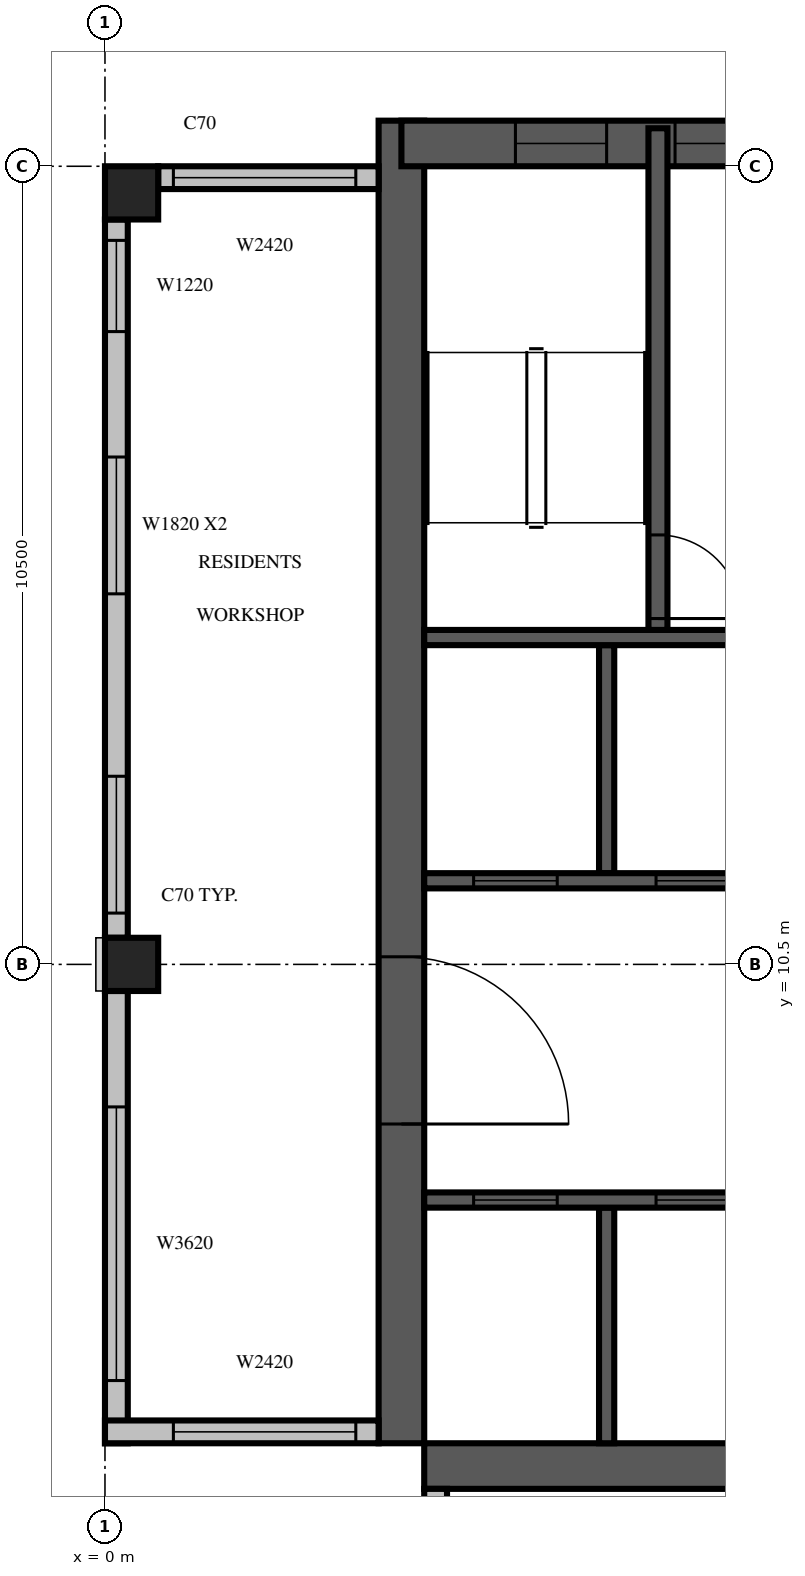
"""IFC4 building model, lengths in metres.
Left out: names, types, materials, properties, quantities, classifications, styles, units other than length and angle.
Written with IfcOpenShell. Run it as: python <this file> out.ifc"""

import sys

from ifc_helpers import new_model, si_unit, direction, frame, frame_2d, origin, origin_2d, place, context, subcontext, project, spatial, rectangle, extrude, source, transform, mapped, element, fill, save


model = new_model("IFC4")
c1 = context("Model", 3, precision=1e-05, world=origin(), true_north=direction((0.0, 1.0)))
c2 = subcontext(c1, "Body", "Model", "MODEL_VIEW")
j1 = project(units=[si_unit("LENGTHUNIT", "METRE"), si_unit("PLANEANGLEUNIT", "RADIAN")], contexts=[c1])
p1 = place(None, origin())
s1 = spatial("IfcSite", under=j1, at=p1, CompositionType="ELEMENT")
p2 = place(p1, origin())
s2 = spatial("IfcBuilding", under=s1, at=p2, CompositionType="ELEMENT")
p3 = place(p2, frame((0.0, 0.0, 316.0)))
s3 = spatial("IfcBuildingStorey", under=s2, at=p3, CompositionType="ELEMENT", Elevation=316.0)
m1 = source(origin(), c2, "Body", "SweptSolid", [
    extrude(rectangle(XDim=0.7, YDim=0.7, at=origin_2d()), origin(), (0.0, 0.0, 1.0), 3.5),
])
for number, where, z_axis, x_axis in (
    (1, (0.35, 10.5, 0.0), (0.0, 0.0, 1.0), (1.0, 0.0, 0.0)),
    (2, (0.35, 20.65, 0.0), (0.0, 0.0, 1.0), (1.0, 0.0, 0.0)),
):
    element("IfcColumn", number, at=place(p3, frame(where, z_axis=z_axis, x_axis=x_axis)), inside=s3, PredefinedType="COLUMN", context=c2, shape_type="MappedRepresentation", body=[
        mapped(m1, transform((0.0, 0.0, 0.0), scale=1.0)),
    ])
m2 = source(origin(), c2, "Body", "SweptSolid", [
    extrude(rectangle(XDim=17.4, YDim=0.6, at=frame_2d((8.7, 0.0))), origin(), (0.0, 0.0, 1.0), 3.5),
])
p4 = place(p3, frame((3.9, 4.2, 0.0), z_axis=(0.0, 0.0, 1.0), x_axis=(0.0, 1.0, 0.0)))
e3 = element("IfcWall", 3, at=p4, inside=s3, PredefinedType="SHEAR", context=c2, shape_type="MappedRepresentation", body=[
    mapped(m2, transform((0.0, 0.0, 0.0), scale=1.0)),
])
m3 = source(origin(), c2, "Body", "SweptSolid", [
    extrude(rectangle(XDim=2.2, YDim=2.1, at=frame_2d((1.1, 1.05))), frame((0.0, 0.31, 0.0), z_axis=(0.0, -1.0, 0.0), x_axis=(1.0, 0.0, 0.0)), (0.0, 0.0, 1.0), 0.62),
])
p5 = place(p4, frame((4.2, 0.0, 0.0)))
e4 = element("IfcOpeningElement", 4, at=p5, cuts=e3, PredefinedType="OPENING", context=c2, shape_type="MappedRepresentation", body=[
    mapped(m3, transform((0.0, 0.0, 0.0), scale=1.0)),
])
p6 = place(p3, frame((4.2, 3.9, 0.0), z_axis=(0.0, 0.0, 1.0), x_axis=(1.0, 0.0, 0.0)))
e5 = element("IfcWall", 5, at=p6, inside=s3, PredefinedType="SHEAR", context=c2, shape_type="MappedRepresentation", body=[
    mapped(m2, transform((0.0, 0.0, 0.0), scale=1.0)),
])
m4 = source(origin(), c2, "Body", "SweptSolid", [
    extrude(rectangle(XDim=0.9, YDim=2.1, at=frame_2d((0.45, 1.05))), frame((0.0, 0.31, 0.0), z_axis=(0.0, -1.0, 0.0), x_axis=(1.0, 0.0, 0.0)), (0.0, 0.0, 1.0), 0.62),
])
p7 = place(p6, frame((14.0, 0.0, 0.0)))
e6 = element("IfcOpeningElement", 6, at=p7, cuts=e5, PredefinedType="OPENING", context=c2, shape_type="MappedRepresentation", body=[
    mapped(m4, transform((0.0, 0.0, 0.0), scale=1.0)),
])
m5 = source(origin(), c2, "Body", "SweptSolid", [
    extrude(rectangle(XDim=6.6, YDim=0.6, at=frame_2d((3.3, 0.0))), origin(), (0.0, 0.0, 1.0), 3.5),
])
p8 = place(p3, frame((3.9, 21.3, 0.0), z_axis=(0.0, 0.0, 1.0), x_axis=(1.0, 0.0, 0.0)))
e7 = element("IfcWall", 7, at=p8, inside=s3, PredefinedType="SHEAR", context=c2, shape_type="MappedRepresentation", body=[
    mapped(m5, transform((0.0, 0.0, 0.0), scale=1.0)),
])
m6 = source(origin(), c2, "Body", "SweptSolid", [
    extrude(rectangle(XDim=1.2, YDim=2.4, at=frame_2d((0.6, 1.2))), frame((0.0, 0.31, 0.0), z_axis=(0.0, -1.0, 0.0), x_axis=(1.0, 0.0, 0.0)), (0.0, 0.0, 1.0), 0.62),
])
p9 = place(p8, frame((1.5, 0.0, 0.6)))
e8 = element("IfcOpeningElement", 8, at=p9, cuts=e7, PredefinedType="OPENING", context=c2, shape_type="MappedRepresentation", body=[
    mapped(m6, transform((0.0, 0.0, 0.0), scale=1.0)),
])
p10 = place(p8, frame((3.6, 0.0, 0.6)))
e9 = element("IfcOpeningElement", 9, at=p10, cuts=e7, PredefinedType="OPENING", context=c2, shape_type="MappedRepresentation", body=[
    mapped(m6, transform((0.0, 0.0, 0.0), scale=1.0)),
])
m7 = source(origin(), c2, "Body", "SweptSolid", [
    extrude(rectangle(XDim=2.9, YDim=0.3, at=frame_2d((1.45, 0.0))), origin(), (0.0, 0.0, 1.0), 3.1),
])
p11 = place(p3, frame((3.6, 20.85, 0.0), z_axis=(0.0, 0.0, 1.0), x_axis=(-1.0, 0.0, 0.0)))
e10 = element("IfcWall", 10, at=p11, inside=s3, PredefinedType="STANDARD", context=c2, shape_type="MappedRepresentation", body=[
    mapped(m7, transform((0.0, 0.0, 0.0), scale=1.0)),
])
m8 = source(origin(), c2, "Body", "SweptSolid", [
    extrude(rectangle(XDim=2.4, YDim=2.0, at=frame_2d((1.2, 1.0))), frame((0.0, 0.16, 0.0), z_axis=(0.0, -1.0, 0.0), x_axis=(1.0, 0.0, 0.0)), (0.0, 0.0, 1.0), 0.32),
])
p12 = place(p11, frame((0.3, 0.0, 0.6)))
e11 = element("IfcOpeningElement", 11, at=p12, cuts=e10, PredefinedType="OPENING", context=c2, shape_type="MappedRepresentation", body=[
    mapped(m8, transform((0.0, 0.0, 0.0), scale=1.0)),
])
m9 = source(origin(), c2, "Body", "SweptSolid", [
    extrude(rectangle(XDim=9.45, YDim=0.3, at=frame_2d((4.725, 0.0))), origin(), (0.0, 0.0, 1.0), 3.1),
])
p13 = place(p3, frame((0.15, 20.3, 0.0), z_axis=(0.0, 0.0, 1.0), x_axis=(0.0, -1.0, 0.0)))
e12 = element("IfcWall", 12, at=p13, inside=s3, PredefinedType="STANDARD", context=c2, shape_type="MappedRepresentation", body=[
    mapped(m9, transform((0.0, 0.0, 0.0), scale=1.0)),
])
m10 = source(origin(), c2, "Body", "SweptSolid", [
    extrude(rectangle(XDim=1.2, YDim=2.0, at=frame_2d((0.6, 1.0))), frame((0.0, 0.16, 0.0), z_axis=(0.0, -1.0, 0.0), x_axis=(1.0, 0.0, 0.0)), (0.0, 0.0, 1.0), 0.32),
])
p14 = place(p13, frame((0.275, 0.0, 0.6)))
e13 = element("IfcOpeningElement", 13, at=p14, cuts=e12, PredefinedType="OPENING", context=c2, shape_type="MappedRepresentation", body=[
    mapped(m10, transform((0.0, 0.0, 0.0), scale=1.0)),
])
m11 = source(origin(), c2, "Body", "SweptSolid", [
    extrude(rectangle(XDim=1.8, YDim=2.0, at=frame_2d((0.9, 1.0))), frame((0.0, 0.16, 0.0), z_axis=(0.0, -1.0, 0.0), x_axis=(1.0, 0.0, 0.0)), (0.0, 0.0, 1.0), 0.32),
])
p15 = place(p13, frame((3.125, 0.0, 0.6)))
e14 = element("IfcOpeningElement", 14, at=p15, cuts=e12, PredefinedType="OPENING", context=c2, shape_type="MappedRepresentation", body=[
    mapped(m11, transform((0.0, 0.0, 0.0), scale=1.0)),
])
p16 = place(p13, frame((7.325, 0.0, 0.6)))
e15 = element("IfcOpeningElement", 15, at=p16, cuts=e12, PredefinedType="OPENING", context=c2, shape_type="MappedRepresentation", body=[
    mapped(m11, transform((0.0, 0.0, 0.0), scale=1.0)),
])
m12 = source(origin(), c2, "Body", "SweptSolid", [
    extrude(rectangle(XDim=5.95, YDim=0.3, at=frame_2d((2.975, 0.0))), origin(), (0.0, 0.0, 1.0), 3.1),
])
p17 = place(p3, frame((0.15, 10.15, 0.0), z_axis=(0.0, 0.0, 1.0), x_axis=(0.0, -1.0, 0.0)))
e16 = element("IfcWall", 16, at=p17, inside=s3, PredefinedType="STANDARD", context=c2, shape_type="MappedRepresentation", body=[
    mapped(m12, transform((0.0, 0.0, 0.0), scale=1.0)),
])
m13 = source(origin(), c2, "Body", "SweptSolid", [
    extrude(rectangle(XDim=3.6, YDim=2.0, at=frame_2d((1.8, 1.0))), frame((0.0, 0.16, 0.0), z_axis=(0.0, -1.0, 0.0), x_axis=(1.0, 0.0, 0.0)), (0.0, 0.0, 1.0), 0.32),
])
p18 = place(p17, frame((1.525, 0.0, 0.6)))
e17 = element("IfcOpeningElement", 17, at=p18, cuts=e16, PredefinedType="OPENING", context=c2, shape_type="MappedRepresentation", body=[
    mapped(m13, transform((0.0, 0.0, 0.0), scale=1.0)),
])
m14 = source(origin(), c2, "Body", "SweptSolid", [
    extrude(rectangle(XDim=3.6, YDim=0.3, at=frame_2d((1.8, 0.0))), origin(), (0.0, 0.0, 1.0), 3.1),
])
p19 = place(p3, frame((0.0, 4.35, 0.0), z_axis=(0.0, 0.0, 1.0), x_axis=(1.0, 0.0, 0.0)))
e18 = element("IfcWall", 18, at=p19, inside=s3, PredefinedType="STANDARD", context=c2, shape_type="MappedRepresentation", body=[
    mapped(m14, transform((0.0, 0.0, 0.0), scale=1.0)),
])
p20 = place(p19, frame((0.9, 0.0, 0.6)))
e19 = element("IfcOpeningElement", 19, at=p20, cuts=e18, PredefinedType="OPENING", context=c2, shape_type="MappedRepresentation", body=[
    mapped(m8, transform((0.0, 0.0, 0.0), scale=1.0)),
])
p21 = place(p3, frame((4.35, 3.6, 0.0), z_axis=(0.0, 0.0, 1.0), x_axis=(0.0, -1.0, 0.0)))
e20 = element("IfcWall", 20, at=p21, inside=s3, PredefinedType="STANDARD", context=c2, shape_type="MappedRepresentation", body=[
    mapped(m14, transform((0.0, 0.0, 0.0), scale=1.0)),
])
p22 = place(p21, frame((0.3, 0.0, 0.6)))
e21 = element("IfcOpeningElement", 21, at=p22, cuts=e20, PredefinedType="OPENING", context=c2, shape_type="MappedRepresentation", body=[
    mapped(m8, transform((0.0, 0.0, 0.0), scale=1.0)),
])
m15 = source(origin(), c2, "Body", "SweptSolid", [
    extrude(rectangle(XDim=3.1, YDim=0.2, at=frame_2d((1.55, 0.0))), origin(), (0.0, 0.0, 1.0), 3.5),
])
p23 = place(p3, frame((6.6, 4.2, 0.0), z_axis=(0.0, 0.0, 1.0), x_axis=(0.0, 1.0, 0.0)))
e22 = element("IfcWall", 22, at=p23, inside=s3, PredefinedType="SOLIDWALL", context=c2, shape_type="MappedRepresentation", body=[
    mapped(m15, transform((0.0, 0.0, 0.0), scale=1.0)),
])
m16 = source(origin(), c2, "Body", "SweptSolid", [
    extrude(rectangle(XDim=3.0, YDim=0.2, at=frame_2d((1.5, 0.0))), origin(), (0.0, 0.0, 1.0), 3.5),
])
p24 = place(p3, frame((6.6, 11.7, 0.0), z_axis=(0.0, 0.0, 1.0), x_axis=(0.0, 1.0, 0.0)))
e23 = element("IfcWall", 23, at=p24, inside=s3, PredefinedType="SOLIDWALL", context=c2, shape_type="MappedRepresentation", body=[
    mapped(m16, transform((0.0, 0.0, 0.0), scale=1.0)),
])
m17 = source(origin(), c2, "Body", "SweptSolid", [
    extrude(rectangle(XDim=9.6, YDim=0.2, at=frame_2d((4.8, 0.0))), origin(), (0.0, 0.0, 1.0), 3.5),
])
p25 = place(p3, frame((4.2, 7.4, 0.0), z_axis=(0.0, 0.0, 1.0), x_axis=(1.0, 0.0, 0.0)))
e24 = element("IfcWall", 24, at=p25, inside=s3, PredefinedType="SOLIDWALL", context=c2, shape_type="MappedRepresentation", body=[
    mapped(m17, transform((0.0, 0.0, 0.0), scale=1.0)),
])
m18 = source(origin(), c2, "Body", "SweptSolid", [
    extrude(rectangle(XDim=1.1, YDim=2.1, at=frame_2d((0.55, 1.05))), frame((0.0, 0.11, 0.0), z_axis=(0.0, -1.0, 0.0), x_axis=(1.0, 0.0, 0.0)), (0.0, 0.0, 1.0), 0.22),
])
p26 = place(p25, frame((0.65, 0.0, 0.0)))
e25 = element("IfcOpeningElement", 25, at=p26, cuts=e24, PredefinedType="OPENING", context=c2, shape_type="MappedRepresentation", body=[
    mapped(m18, transform((0.0, 0.0, 0.0), scale=1.0)),
])
p27 = place(p25, frame((3.05, 0.0, 0.0)))
e26 = element("IfcOpeningElement", 26, at=p27, cuts=e24, PredefinedType="OPENING", context=c2, shape_type="MappedRepresentation", body=[
    mapped(m18, transform((0.0, 0.0, 0.0), scale=1.0)),
])
p28 = place(p25, frame((5.45, 0.0, 0.0)))
e27 = element("IfcOpeningElement", 27, at=p28, cuts=e24, PredefinedType="OPENING", context=c2, shape_type="MappedRepresentation", body=[
    mapped(m18, transform((0.0, 0.0, 0.0), scale=1.0)),
])
p29 = place(p25, frame((7.85, 0.0, 0.0)))
e28 = element("IfcOpeningElement", 28, at=p29, cuts=e24, PredefinedType="OPENING", context=c2, shape_type="MappedRepresentation", body=[
    mapped(m18, transform((0.0, 0.0, 0.0), scale=1.0)),
])
m19 = source(origin(), c2, "Body", "SweptSolid", [
    extrude(rectangle(XDim=4.8, YDim=0.2, at=frame_2d((2.4, 0.0))), origin(), (0.0, 0.0, 1.0), 3.5),
])
p30 = place(p3, frame((4.2, 11.6, 0.0), z_axis=(0.0, 0.0, 1.0), x_axis=(1.0, 0.0, 0.0)))
e29 = element("IfcWall", 29, at=p30, inside=s3, PredefinedType="SOLIDWALL", context=c2, shape_type="MappedRepresentation", body=[
    mapped(m19, transform((0.0, 0.0, 0.0), scale=1.0)),
])
p31 = place(p30, frame((0.65, 0.0, 0.0)))
e30 = element("IfcOpeningElement", 30, at=p31, cuts=e29, PredefinedType="OPENING", context=c2, shape_type="MappedRepresentation", body=[
    mapped(m18, transform((0.0, 0.0, 0.0), scale=1.0)),
])
p32 = place(p30, frame((3.05, 0.0, 0.0)))
e31 = element("IfcOpeningElement", 31, at=p32, cuts=e29, PredefinedType="OPENING", context=c2, shape_type="MappedRepresentation", body=[
    mapped(m18, transform((0.0, 0.0, 0.0), scale=1.0)),
])
p33 = place(p3, frame((4.2, 14.8, 0.0), z_axis=(0.0, 0.0, 1.0), x_axis=(1.0, 0.0, 0.0)))
e32 = element("IfcWall", 32, at=p33, inside=s3, PredefinedType="SOLIDWALL", context=c2, shape_type="MappedRepresentation", body=[
    mapped(m19, transform((0.0, 0.0, 0.0), scale=1.0)),
])
m20 = source(origin(), c2, "Body", "SweptSolid", [
    extrude(rectangle(XDim=6.6, YDim=0.25, at=frame_2d((3.3, 0.0))), origin(), (0.0, 0.0, 1.0), 3.1),
])
p34 = place(p3, frame((7.275, 14.9, 0.0), z_axis=(0.0, 0.0, 1.0), x_axis=(0.0, 1.0, 0.0)))
e33 = element("IfcWall", 33, at=p34, inside=s3, PredefinedType="SOLIDWALL", context=c2, shape_type="MappedRepresentation", body=[
    mapped(m20, transform((0.0, 0.0, 0.0), scale=1.0)),
])
m21 = source(origin(), c2, "Body", "SweptSolid", [
    extrude(rectangle(XDim=1.1, YDim=2.1, at=frame_2d((0.55, 1.05))), frame((0.0, 0.135, 0.0), z_axis=(0.0, -1.0, 0.0), x_axis=(1.0, 0.0, 0.0)), (0.0, 0.0, 1.0), 0.27),
])
p35 = place(p34, frame((0.15, 0.0, 0.0)))
e34 = element("IfcOpeningElement", 34, at=p35, cuts=e33, PredefinedType="OPENING", context=c2, shape_type="MappedRepresentation", body=[
    mapped(m21, transform((0.0, 0.0, 0.0), scale=1.0)),
])
m22 = source(origin(), c2, "Body", "SweptSolid", [
    extrude(rectangle(XDim=2.4, YDim=2.0, at=frame_2d((1.2, 1.0))), frame((0.0, 0.03, 0.0), z_axis=(0.0, -1.0, 0.0), x_axis=(1.0, 0.0, 0.0)), (0.0, 0.0, 1.0), 0.06),
])
p36 = place(p12, origin())
e35 = element("IfcWindow", 35, at=p36, inside=s3, PartitioningType="SINGLE_PANEL", PredefinedType="WINDOW", context=c2, shape_type="MappedRepresentation", body=[
    mapped(m22, transform((0.0, 0.0, 0.0), scale=1.0)),
])
fill(e11, e35)
m23 = source(origin(), c2, "Body", "SweptSolid", [
    extrude(rectangle(XDim=1.2, YDim=2.0, at=frame_2d((0.6, 1.0))), frame((0.0, 0.03, 0.0), z_axis=(0.0, -1.0, 0.0), x_axis=(1.0, 0.0, 0.0)), (0.0, 0.0, 1.0), 0.06),
])
p37 = place(p14, origin())
e36 = element("IfcWindow", 36, at=p37, inside=s3, PartitioningType="SINGLE_PANEL", PredefinedType="WINDOW", context=c2, shape_type="MappedRepresentation", body=[
    mapped(m23, transform((0.0, 0.0, 0.0), scale=1.0)),
])
fill(e13, e36)
m24 = source(origin(), c2, "Body", "SweptSolid", [
    extrude(rectangle(XDim=1.8, YDim=2.0, at=frame_2d((0.9, 1.0))), frame((0.0, 0.03, 0.0), z_axis=(0.0, -1.0, 0.0), x_axis=(1.0, 0.0, 0.0)), (0.0, 0.0, 1.0), 0.06),
])
p38 = place(p15, origin())
e37 = element("IfcWindow", 37, at=p38, inside=s3, PartitioningType="SINGLE_PANEL", PredefinedType="WINDOW", context=c2, shape_type="MappedRepresentation", body=[
    mapped(m24, transform((0.0, 0.0, 0.0), scale=1.0)),
])
fill(e14, e37)
p39 = place(p16, origin())
e38 = element("IfcWindow", 38, at=p39, inside=s3, PartitioningType="SINGLE_PANEL", PredefinedType="WINDOW", context=c2, shape_type="MappedRepresentation", body=[
    mapped(m24, transform((0.0, 0.0, 0.0), scale=1.0)),
])
fill(e15, e38)
m25 = source(origin(), c2, "Body", "SweptSolid", [
    extrude(rectangle(XDim=3.6, YDim=2.0, at=frame_2d((1.8, 1.0))), frame((0.0, 0.03, 0.0), z_axis=(0.0, -1.0, 0.0), x_axis=(1.0, 0.0, 0.0)), (0.0, 0.0, 1.0), 0.06),
])
p40 = place(p18, origin())
e39 = element("IfcWindow", 39, at=p40, inside=s3, PartitioningType="SINGLE_PANEL", PredefinedType="WINDOW", context=c2, shape_type="MappedRepresentation", body=[
    mapped(m25, transform((0.0, 0.0, 0.0), scale=1.0)),
])
fill(e17, e39)
p41 = place(p20, origin())
e40 = element("IfcWindow", 40, at=p41, inside=s3, PartitioningType="SINGLE_PANEL", PredefinedType="WINDOW", context=c2, shape_type="MappedRepresentation", body=[
    mapped(m22, transform((0.0, 0.0, 0.0), scale=1.0)),
])
fill(e19, e40)
m26 = source(origin(), c2, "Body", "SweptSolid", [
    extrude(rectangle(XDim=1.1, YDim=2.1, at=frame_2d((0.55, 1.05))), frame((0.0, 0.025, 0.0), z_axis=(0.0, -1.0, 0.0), x_axis=(1.0, 0.0, 0.0)), (0.0, 0.0, 1.0), 0.05),
])
p42 = place(p26, origin())
e41 = element("IfcDoor", 41, at=p42, inside=s3, OperationType="SLIDING_TO_LEFT", PredefinedType="DOOR", context=c2, shape_type="MappedRepresentation", body=[
    mapped(m26, transform((0.0, 0.0, 0.0), scale=1.0)),
])
fill(e25, e41)
p43 = place(p27, origin())
e42 = element("IfcDoor", 42, at=p43, inside=s3, OperationType="SLIDING_TO_LEFT", PredefinedType="DOOR", context=c2, shape_type="MappedRepresentation", body=[
    mapped(m26, transform((0.0, 0.0, 0.0), scale=1.0)),
])
fill(e26, e42)
p44 = place(p31, origin())
e43 = element("IfcDoor", 43, at=p44, inside=s3, OperationType="SLIDING_TO_LEFT", PredefinedType="DOOR", context=c2, shape_type="MappedRepresentation", body=[
    mapped(m26, transform((0.0, 0.0, 0.0), scale=1.0)),
])
fill(e30, e43)
p45 = place(p32, origin())
e44 = element("IfcDoor", 44, at=p45, inside=s3, OperationType="SLIDING_TO_LEFT", PredefinedType="DOOR", context=c2, shape_type="MappedRepresentation", body=[
    mapped(m26, transform((0.0, 0.0, 0.0), scale=1.0)),
])
fill(e31, e44)
p46 = place(p35, origin())
e45 = element("IfcDoor", 45, at=p46, inside=s3, OperationType="SINGLE_SWING_RIGHT", PredefinedType="DOOR", context=c2, shape_type="MappedRepresentation", body=[
    mapped(m26, transform((0.0, 0.0, 0.0), scale=1.0)),
])
fill(e34, e45)
m27 = source(origin(), c2, "Body", "SweptSolid", [
    extrude(rectangle(XDim=2.2, YDim=2.1, at=frame_2d((1.1, 1.05))), frame((0.0, 0.025, 0.0), z_axis=(0.0, -1.0, 0.0), x_axis=(1.0, 0.0, 0.0)), (0.0, 0.0, 1.0), 0.05),
])
p47 = place(p5, origin())
e46 = element("IfcDoor", 46, at=p47, inside=s3, OperationType="DOUBLE_DOOR_SINGLE_SWING", PredefinedType="DOOR", context=c2, shape_type="MappedRepresentation", body=[
    mapped(m27, transform((0.0, 0.0, 0.0), scale=1.0)),
])
fill(e4, e46)
m28 = source(origin(), c2, "Body", "SweptSolid", [
    extrude(rectangle(XDim=1.2, YDim=2.4, at=frame_2d((0.6, 1.2))), frame((0.0, 0.03, 0.0), z_axis=(0.0, -1.0, 0.0), x_axis=(1.0, 0.0, 0.0)), (0.0, 0.0, 1.0), 0.06),
])
p48 = place(p9, origin())
e47 = element("IfcWindow", 47, at=p48, inside=s3, PartitioningType="SINGLE_PANEL", PredefinedType="WINDOW", context=c2, shape_type="MappedRepresentation", body=[
    mapped(m28, transform((0.0, 0.0, 0.0), scale=1.0)),
])
fill(e8, e47)
p49 = place(p10, origin())
e48 = element("IfcWindow", 48, at=p49, inside=s3, PartitioningType="SINGLE_PANEL", PredefinedType="WINDOW", context=c2, shape_type="MappedRepresentation", body=[
    mapped(m28, transform((0.0, 0.0, 0.0), scale=1.0)),
])
fill(e9, e48)
save(model, sys.argv[1])
